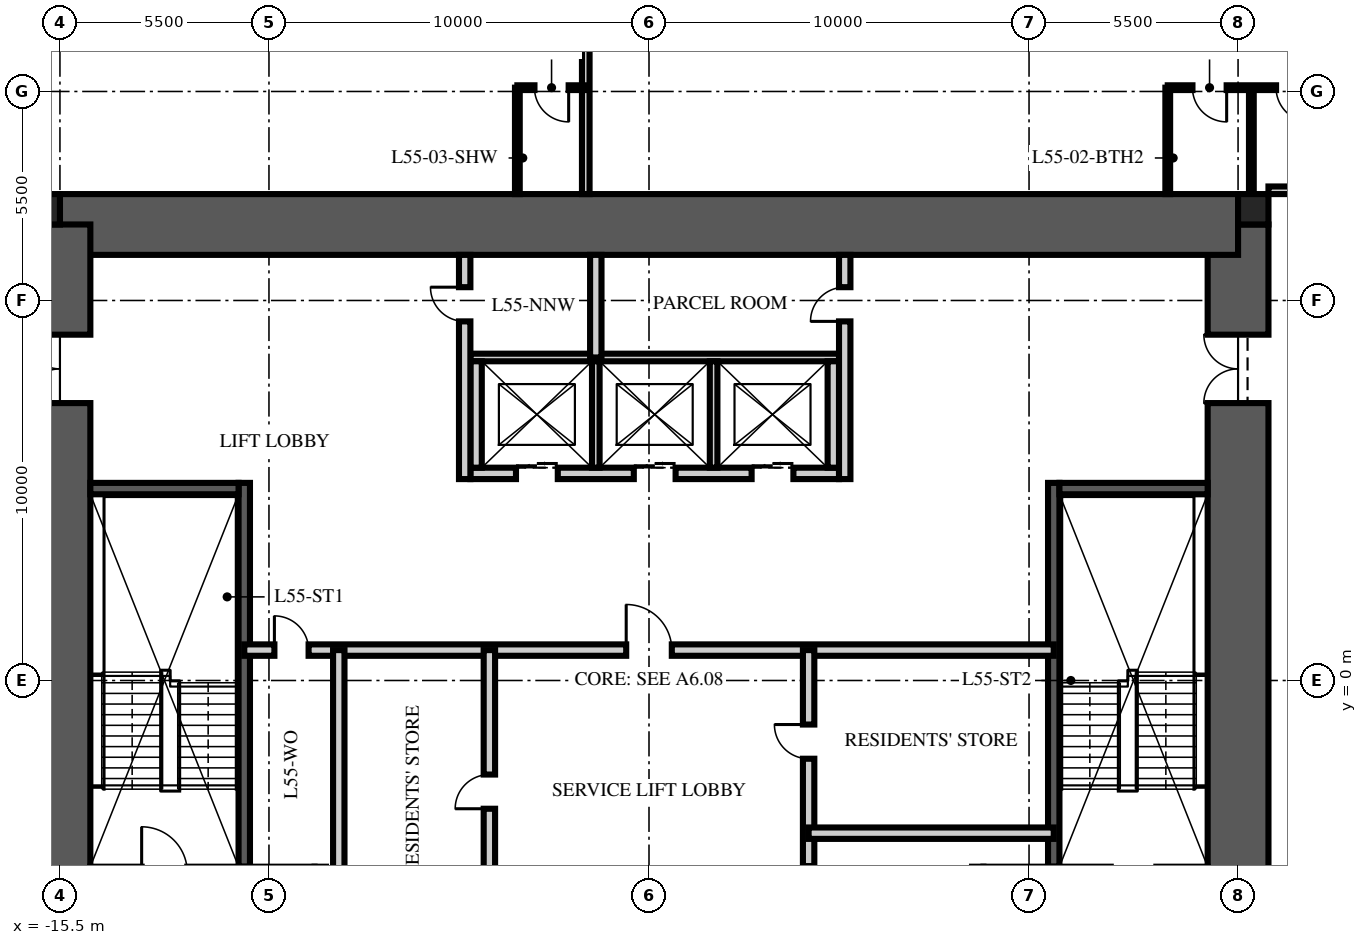
"""IFC4 building model, lengths in metres.
Left out: names, types, materials, properties, quantities, classifications, styles, units other than length and angle.
Written with IfcOpenShell. Run it as: python <this file> out.ifc"""

import sys

from ifc_helpers import new_model, si_unit, direction, frame, frame_2d, origin, origin_2d, place, context, subcontext, project, spatial, rectangle, extrude, element, fill, save


model = new_model("IFC4")
c1 = context("Model", 3, precision=1e-05, world=origin(), true_north=direction((0.0, 1.0)))
c2 = subcontext(c1, "Body", "Model", "MODEL_VIEW")
j1 = project(units=[si_unit("LENGTHUNIT", "METRE"), si_unit("PLANEANGLEUNIT", "RADIAN")], contexts=[c1])
p1 = place(None, origin())
s1 = spatial("IfcSite", under=j1, at=p1, CompositionType="ELEMENT")
p2 = place(p1, origin())
s2 = spatial("IfcBuilding", under=s1, at=p2, CompositionType="ELEMENT")
p3 = place(p2, frame((0.0, 0.0, 222.0)))
s3 = spatial("IfcBuildingStorey", under=s2, at=p3, CompositionType="ELEMENT", Elevation=222.0)
p4 = place(p3, frame((15.5, -12.0, -0.25), z_axis=(0.0, 0.0, 1.0), x_axis=(0.0, 1.0, 0.0)))
e1 = element("IfcWall", 1, at=p4, inside=s3, PredefinedType="SHEAR", context=c2, shape_type="SweptSolid", body=[
    extrude(rectangle(XDim=24.0, YDim=1.6, at=frame_2d((12.0, 0.0))), origin(), (0.0, 0.0, 1.0), 3.75),
])
p5 = place(p4, frame((3.2, 0.0, 0.25)))
e2 = element("IfcOpeningElement", 2, at=p5, cuts=e1, PredefinedType="OPENING", context=c2, shape_type="SweptSolid", body=[
    extrude(rectangle(XDim=1.2, YDim=2.1, at=frame_2d((0.6, 1.05))), frame((0.0, 0.81, 0.0), z_axis=(0.0, -1.0, 0.0), x_axis=(1.0, 0.0, 0.0)), (0.0, 0.0, 1.0), 1.62),
])
p6 = place(p4, frame((19.3, 0.0, 0.25)))
e3 = element("IfcOpeningElement", 3, at=p6, cuts=e1, PredefinedType="OPENING", context=c2, shape_type="SweptSolid", body=[
    extrude(rectangle(XDim=1.8, YDim=2.1, at=frame_2d((0.9, 1.05))), frame((0.0, 0.81, 0.0), z_axis=(0.0, -1.0, 0.0), x_axis=(1.0, 0.0, 0.0)), (0.0, 0.0, 1.0), 1.62),
])
p7 = place(p3, frame((-15.5, 12.0, -0.25), z_axis=(0.0, 0.0, 1.0), x_axis=(1.0, 0.0, 0.0)))
e4 = element("IfcWall", 4, at=p7, inside=s3, PredefinedType="SHEAR", context=c2, shape_type="SweptSolid", body=[
    extrude(rectangle(XDim=31.0, YDim=1.6, at=frame_2d((15.5, 0.0))), origin(), (0.0, 0.0, 1.0), 3.75),
])
p8 = place(p3, frame((-15.5, -12.0, -0.25), z_axis=(0.0, 0.0, 1.0), x_axis=(0.0, 1.0, 0.0)))
e5 = element("IfcWall", 5, at=p8, inside=s3, PredefinedType="SHEAR", context=c2, shape_type="SweptSolid", body=[
    extrude(rectangle(XDim=24.0, YDim=1.6, at=frame_2d((12.0, 0.0))), origin(), (0.0, 0.0, 1.0), 3.75),
])
p9 = place(p8, frame((3.2, 0.0, 0.25)))
e6 = element("IfcOpeningElement", 6, at=p9, cuts=e5, PredefinedType="OPENING", context=c2, shape_type="SweptSolid", body=[
    extrude(rectangle(XDim=1.2, YDim=2.1, at=frame_2d((0.6, 1.05))), frame((0.0, 0.81, 0.0), z_axis=(0.0, -1.0, 0.0), x_axis=(1.0, 0.0, 0.0)), (0.0, 0.0, 1.0), 1.62),
])
p10 = place(p8, frame((19.3, 0.0, 0.25)))
e7 = element("IfcOpeningElement", 7, at=p10, cuts=e5, PredefinedType="OPENING", context=c2, shape_type="SweptSolid", body=[
    extrude(rectangle(XDim=1.8, YDim=2.1, at=frame_2d((0.9, 1.05))), frame((0.0, 0.81, 0.0), z_axis=(0.0, -1.0, 0.0), x_axis=(1.0, 0.0, 0.0)), (0.0, 0.0, 1.0), 1.62),
])
for number, where, z_axis, x_axis in (
    (8, (15.9, 12.4, -0.25), (0.0, 0.0, 1.0), (1.0, 0.0, 0.0)),
    (9, (-15.9, 12.4, -0.25), (0.0, 0.0, 1.0), (1.0, 0.0, 0.0)),
):
    element("IfcColumn", number, at=place(p3, frame(where, z_axis=z_axis, x_axis=x_axis)), inside=s3, PredefinedType="COLUMN", context=c2, shape_type="SweptSolid", body=[
        extrude(rectangle(XDim=0.8, YDim=0.8, at=origin_2d()), origin(), (0.0, 0.0, 1.0), 3.75),
    ])
p11 = place(p3, frame((-10.65, -4.9, 0.0), z_axis=(0.0, 0.0, 1.0), x_axis=(0.0, 1.0, 0.0)))
e10 = element("IfcWall", 10, at=p11, inside=s3, PredefinedType="SOLIDWALL", context=c2, shape_type="SweptSolid", body=[
    extrude(rectangle(XDim=10.1, YDim=0.3, at=frame_2d((5.05, 0.0))), origin(), (0.0, 0.0, 1.0), 3.5),
])
p12 = place(p3, frame((-14.7, 5.05, 0.0), z_axis=(0.0, 0.0, 1.0), x_axis=(1.0, 0.0, 0.0)))
e11 = element("IfcWall", 11, at=p12, inside=s3, PredefinedType="SOLIDWALL", context=c2, shape_type="SweptSolid", body=[
    extrude(rectangle(XDim=3.9, YDim=0.3, at=frame_2d((1.95, 0.0))), origin(), (0.0, 0.0, 1.0), 3.5),
])
p13 = place(p3, frame((10.65, -4.9, 0.0), z_axis=(0.0, 0.0, 1.0), x_axis=(0.0, 1.0, 0.0)))
e12 = element("IfcWall", 12, at=p13, inside=s3, PredefinedType="SOLIDWALL", context=c2, shape_type="SweptSolid", body=[
    extrude(rectangle(XDim=10.1, YDim=0.3, at=frame_2d((5.05, 0.0))), origin(), (0.0, 0.0, 1.0), 3.5),
])
p14 = place(p3, frame((14.7, 5.05, 0.0), z_axis=(0.0, 0.0, 1.0), x_axis=(-1.0, 0.0, 0.0)))
e13 = element("IfcWall", 13, at=p14, inside=s3, PredefinedType="SOLIDWALL", context=c2, shape_type="SweptSolid", body=[
    extrude(rectangle(XDim=3.9, YDim=0.3, at=frame_2d((1.95, 0.0))), origin(), (0.0, 0.0, 1.0), 3.5),
])
p15 = place(p3, frame((-4.7, 5.45, 0.0), z_axis=(0.0, 0.0, 1.0), x_axis=(1.0, 0.0, 0.0)))
e14 = element("IfcWall", 14, at=p15, inside=s3, PredefinedType="PARTITIONING", context=c2, shape_type="SweptSolid", body=[
    extrude(rectangle(XDim=9.7, YDim=0.3, at=frame_2d((4.85, 0.0))), origin(), (0.0, 0.0, 1.0), 3.5),
])
p16 = place(p15, frame((1.2, 0.0, 0.0)))
e15 = element("IfcOpeningElement", 15, at=p16, cuts=e14, PredefinedType="OPENING", context=c2, shape_type="SweptSolid", body=[
    extrude(rectangle(XDim=1.1, YDim=2.1, at=frame_2d((0.55, 1.05))), frame((0.0, 0.16, 0.0), z_axis=(0.0, -1.0, 0.0), x_axis=(1.0, 0.0, 0.0)), (0.0, 0.0, 1.0), 0.32),
])
p17 = place(p15, frame((4.3, 0.0, 0.0)))
e16 = element("IfcOpeningElement", 16, at=p17, cuts=e14, PredefinedType="OPENING", context=c2, shape_type="SweptSolid", body=[
    extrude(rectangle(XDim=1.1, YDim=2.1, at=frame_2d((0.55, 1.05))), frame((0.0, 0.16, 0.0), z_axis=(0.0, -1.0, 0.0), x_axis=(1.0, 0.0, 0.0)), (0.0, 0.0, 1.0), 0.32),
])
p18 = place(p15, frame((7.4, 0.0, 0.0)))
e17 = element("IfcOpeningElement", 17, at=p18, cuts=e14, PredefinedType="OPENING", context=c2, shape_type="SweptSolid", body=[
    extrude(rectangle(XDim=1.1, YDim=2.1, at=frame_2d((0.55, 1.05))), frame((0.0, 0.16, 0.0), z_axis=(0.0, -1.0, 0.0), x_axis=(1.0, 0.0, 0.0)), (0.0, 0.0, 1.0), 0.32),
])
p19 = place(p3, frame((-4.7, 8.5, 0.0), z_axis=(0.0, 0.0, 1.0), x_axis=(1.0, 0.0, 0.0)))
e18 = element("IfcWall", 18, at=p19, inside=s3, PredefinedType="PARTITIONING", context=c2, shape_type="SweptSolid", body=[
    extrude(rectangle(XDim=9.7, YDim=0.2, at=frame_2d((4.85, 0.0))), origin(), (0.0, 0.0, 1.0), 3.5),
])
for number, where, z_axis, x_axis in (
    (19, (-4.55, 5.6, 0.0), (0.0, 0.0, 1.0), (0.0, 1.0, 0.0)),
    (20, (4.85, 5.6, 0.0), (0.0, 0.0, 1.0), (0.0, 1.0, 0.0)),
):
    element("IfcWall", number, at=place(p3, frame(where, z_axis=z_axis, x_axis=x_axis)), inside=s3, PredefinedType="PARTITIONING", context=c2, shape_type="SweptSolid", body=[
        extrude(rectangle(XDim=2.8, YDim=0.3, at=frame_2d((1.4, 0.0))), origin(), (0.0, 0.0, 1.0), 3.5),
    ])
for number, where, z_axis, x_axis in (
    (21, (-1.4, 5.6, 0.0), (0.0, 0.0, 1.0), (0.0, 1.0, 0.0)),
    (22, (1.7, 5.6, 0.0), (0.0, 0.0, 1.0), (0.0, 1.0, 0.0)),
):
    element("IfcWall", number, at=place(p3, frame(where, z_axis=z_axis, x_axis=x_axis)), inside=s3, PredefinedType="PARTITIONING", context=c2, shape_type="SweptSolid", body=[
        extrude(rectangle(XDim=2.8, YDim=0.2, at=frame_2d((1.4, 0.0))), origin(), (0.0, 0.0, 1.0), 3.5),
    ])
p20 = place(p3, frame((-10.65, 0.8, 0.0), z_axis=(0.0, 0.0, 1.0), x_axis=(1.0, 0.0, 0.0)))
e23 = element("IfcWall", 23, at=p20, inside=s3, PredefinedType="PARTITIONING", context=c2, shape_type="SweptSolid", body=[
    extrude(rectangle(XDim=21.3, YDim=0.3, at=frame_2d((10.65, 0.0))), origin(), (0.0, 0.0, 1.0), 3.5),
])
p21 = place(p20, frame((10.05, 0.0, 0.0)))
e24 = element("IfcOpeningElement", 24, at=p21, cuts=e23, PredefinedType="OPENING", context=c2, shape_type="SweptSolid", body=[
    extrude(rectangle(XDim=1.2, YDim=2.1, at=frame_2d((0.6, 1.05))), frame((0.0, 0.16, 0.0), z_axis=(0.0, -1.0, 0.0), x_axis=(1.0, 0.0, 0.0)), (0.0, 0.0, 1.0), 0.32),
])
p22 = place(p20, frame((0.793, 0.0, 0.0)))
e25 = element("IfcOpeningElement", 25, at=p22, cuts=e23, PredefinedType="OPENING", context=c2, shape_type="SweptSolid", body=[
    extrude(rectangle(XDim=0.9, YDim=2.1, at=frame_2d((0.45, 1.05))), frame((0.0, 0.16, 0.0), z_axis=(0.0, -1.0, 0.0), x_axis=(1.0, 0.0, 0.0)), (0.0, 0.0, 1.0), 0.32),
])
p23 = place(p3, frame((-4.2, -6.65, 0.0), z_axis=(0.0, 0.0, 1.0), x_axis=(0.0, 1.0, 0.0)))
e26 = element("IfcWall", 26, at=p23, inside=s3, PredefinedType="PARTITIONING", context=c2, shape_type="SweptSolid", body=[
    extrude(rectangle(XDim=7.45, YDim=0.3, at=frame_2d((3.725, 0.0))), origin(), (0.0, 0.0, 1.0), 3.5),
])
p24 = place(p23, frame((3.275, 0.0, 0.0)))
e27 = element("IfcOpeningElement", 27, at=p24, cuts=e26, PredefinedType="OPENING", context=c2, shape_type="SweptSolid", body=[
    extrude(rectangle(XDim=0.9, YDim=2.1, at=frame_2d((0.45, 1.05))), frame((0.0, 0.16, 0.0), z_axis=(0.0, -1.0, 0.0), x_axis=(1.0, 0.0, 0.0)), (0.0, 0.0, 1.0), 0.32),
])
p25 = place(p3, frame((4.2, -6.65, 0.0), z_axis=(0.0, 0.0, 1.0), x_axis=(0.0, 1.0, 0.0)))
e28 = element("IfcWall", 28, at=p25, inside=s3, PredefinedType="PARTITIONING", context=c2, shape_type="SweptSolid", body=[
    extrude(rectangle(XDim=7.45, YDim=0.3, at=frame_2d((3.725, 0.0))), origin(), (0.0, 0.0, 1.0), 3.5),
])
p26 = place(p25, frame((0.866, 0.0, 0.0)))
e29 = element("IfcOpeningElement", 29, at=p26, cuts=e28, PredefinedType="OPENING", context=c2, shape_type="SweptSolid", body=[
    extrude(rectangle(XDim=0.9, YDim=2.1, at=frame_2d((0.45, 1.05))), frame((0.0, 0.16, 0.0), z_axis=(0.0, -1.0, 0.0), x_axis=(1.0, 0.0, 0.0)), (0.0, 0.0, 1.0), 0.32),
])
p27 = place(p25, frame((4.591, 0.0, 0.0)))
e30 = element("IfcOpeningElement", 30, at=p27, cuts=e28, PredefinedType="OPENING", context=c2, shape_type="SweptSolid", body=[
    extrude(rectangle(XDim=0.9, YDim=2.1, at=frame_2d((0.45, 1.05))), frame((0.0, 0.16, 0.0), z_axis=(0.0, -1.0, 0.0), x_axis=(1.0, 0.0, 0.0)), (0.0, 0.0, 1.0), 0.32),
])
p28 = place(p3, frame((-8.163, -6.65, 0.0), z_axis=(0.0, 0.0, 1.0), x_axis=(0.0, 1.0, 0.0)))
e31 = element("IfcWall", 31, at=p28, inside=s3, PredefinedType="PARTITIONING", context=c2, shape_type="SweptSolid", body=[
    extrude(rectangle(XDim=7.45, YDim=0.3, at=frame_2d((3.725, 0.0))), origin(), (0.0, 0.0, 1.0), 3.5),
])
p29 = place(p3, frame((10.65, -4.018, 0.0), z_axis=(0.0, 0.0, 1.0), x_axis=(-1.0, 0.0, 0.0)))
e32 = element("IfcWall", 32, at=p29, inside=s3, PredefinedType="PARTITIONING", context=c2, shape_type="SweptSolid", body=[
    extrude(rectangle(XDim=6.45, YDim=0.3, at=frame_2d((3.225, 0.0))), origin(), (0.0, 0.0, 1.0), 3.5),
])
p30 = place(p3, frame((-4.85, 5.3, 0.0), z_axis=(0.0, 0.0, 1.0), x_axis=(0.0, 1.0, 0.0)))
e33 = element("IfcWall", 33, at=p30, inside=s3, PredefinedType="PARTITIONING", context=c2, shape_type="SweptSolid", body=[
    extrude(rectangle(XDim=5.9, YDim=0.3, at=frame_2d((2.95, 0.0))), origin(), (0.0, 0.0, 1.0), 3.5),
])
p31 = place(p30, frame((4.15, 0.0, 0.0)))
e34 = element("IfcOpeningElement", 34, at=p31, cuts=e33, PredefinedType="OPENING", context=c2, shape_type="SweptSolid", body=[
    extrude(rectangle(XDim=0.9, YDim=2.1, at=frame_2d((0.45, 1.05))), frame((0.0, 0.16, 0.0), z_axis=(0.0, -1.0, 0.0), x_axis=(1.0, 0.0, 0.0)), (0.0, 0.0, 1.0), 0.32),
])
p32 = place(p3, frame((5.15, 5.3, 0.0), z_axis=(0.0, 0.0, 1.0), x_axis=(0.0, 1.0, 0.0)))
e35 = element("IfcWall", 35, at=p32, inside=s3, PredefinedType="PARTITIONING", context=c2, shape_type="SweptSolid", body=[
    extrude(rectangle(XDim=5.9, YDim=0.3, at=frame_2d((2.95, 0.0))), origin(), (0.0, 0.0, 1.0), 3.5),
])
p33 = place(p32, frame((4.15, 0.0, 0.0)))
e36 = element("IfcOpeningElement", 36, at=p33, cuts=e35, PredefinedType="OPENING", context=c2, shape_type="SweptSolid", body=[
    extrude(rectangle(XDim=0.9, YDim=2.1, at=frame_2d((0.45, 1.05))), frame((0.0, 0.16, 0.0), z_axis=(0.0, -1.0, 0.0), x_axis=(1.0, 0.0, 0.0)), (0.0, 0.0, 1.0), 0.32),
])
p34 = place(p3, frame((-1.4, 8.5, 0.0), z_axis=(0.0, 0.0, 1.0), x_axis=(0.0, 1.0, 0.0)))
e37 = element("IfcWall", 37, at=p34, inside=s3, PredefinedType="PARTITIONING", context=c2, shape_type="SweptSolid", body=[
    extrude(rectangle(XDim=2.7, YDim=0.3, at=frame_2d((1.35, 0.0))), origin(), (0.0, 0.0, 1.0), 3.5),
])
p35 = place(p3, frame((16.3, 12.9, 0.0), z_axis=(0.0, 0.0, 1.0), x_axis=(1.0, 0.0, 0.0)))
e38 = element("IfcWall", 38, at=p35, inside=s3, PredefinedType="PARTITIONING", context=c2, shape_type="SweptSolid", body=[
    extrude(rectangle(XDim=1.6, YDim=0.2, at=frame_2d((0.8, 0.0))), origin(), (0.0, 0.0, 1.0), 2.3),
])
p36 = place(p3, frame((-1.664, 12.8, 0.0), z_axis=(0.0, 0.0, 1.0), x_axis=(0.0, 1.0, 0.0)))
e39 = element("IfcWall", 39, at=p36, inside=s3, PredefinedType="PARTITIONING", context=c2, shape_type="SweptSolid", body=[
    extrude(rectangle(XDim=13.4, YDim=0.2, at=frame_2d((6.7, 0.0))), origin(), (0.0, 0.0, 1.0), 2.91),
])
p37 = place(p3, frame((18.05, 15.6, 0.0), z_axis=(0.0, 0.0, 1.0), x_axis=(-1.0, 0.0, 0.0)))
e40 = element("IfcWall", 40, at=p37, inside=s3, PredefinedType="PARTITIONING", context=c2, shape_type="SweptSolid", body=[
    extrude(rectangle(XDim=4.4, YDim=0.125, at=frame_2d((2.2, 0.0))), origin(), (0.0, 0.0, 1.0), 2.3),
])
p38 = place(p37, frame((0.65, 0.0, 0.0)))
e41 = element("IfcOpeningElement", 41, at=p38, cuts=e40, PredefinedType="OPENING", context=c2, shape_type="SweptSolid", body=[
    extrude(rectangle(XDim=0.9, YDim=2.1, at=frame_2d((0.45, 1.05))), frame((0.0, 0.073, 0.0), z_axis=(0.0, -1.0, 0.0), x_axis=(1.0, 0.0, 0.0)), (0.0, 0.0, 1.0), 0.145),
])
p39 = place(p37, frame((2.85, 0.0, 0.0)))
e42 = element("IfcOpeningElement", 42, at=p39, cuts=e40, PredefinedType="OPENING", context=c2, shape_type="SweptSolid", body=[
    extrude(rectangle(XDim=0.9, YDim=2.1, at=frame_2d((0.45, 1.05))), frame((0.0, 0.073, 0.0), z_axis=(0.0, -1.0, 0.0), x_axis=(1.0, 0.0, 0.0)), (0.0, 0.0, 1.0), 0.145),
])
p40 = place(p3, frame((15.85, 12.8, 0.0), z_axis=(0.0, 0.0, 1.0), x_axis=(0.0, 1.0, 0.0)))
e43 = element("IfcWall", 43, at=p40, inside=s3, PredefinedType="PARTITIONING", context=c2, shape_type="SweptSolid", body=[
    extrude(rectangle(XDim=2.8, YDim=0.125, at=frame_2d((1.4, 0.0))), origin(), (0.0, 0.0, 1.0), 2.3),
])
p41 = place(p3, frame((13.65, 12.8, 0.0), z_axis=(0.0, 0.0, 1.0), x_axis=(0.0, 1.0, 0.0)))
e44 = element("IfcWall", 44, at=p41, inside=s3, PredefinedType="PARTITIONING", context=c2, shape_type="SweptSolid", body=[
    extrude(rectangle(XDim=2.8, YDim=0.125, at=frame_2d((1.4, 0.0))), origin(), (0.0, 0.0, 1.0), 3.5),
])
p42 = place(p3, frame((-1.664, 15.6, 0.0), z_axis=(0.0, 0.0, 1.0), x_axis=(-1.0, 0.0, 0.0)))
e45 = element("IfcWall", 45, at=p42, inside=s3, PredefinedType="PARTITIONING", context=c2, shape_type="SweptSolid", body=[
    extrude(rectangle(XDim=1.8, YDim=0.125, at=frame_2d((0.9, 0.0))), origin(), (0.0, 0.0, 1.0), 3.5),
])
p43 = place(p42, frame((0.45, 0.0, 0.0)))
e46 = element("IfcOpeningElement", 46, at=p43, cuts=e45, PredefinedType="OPENING", context=c2, shape_type="SweptSolid", body=[
    extrude(rectangle(XDim=0.9, YDim=2.1, at=frame_2d((0.45, 1.05))), frame((0.0, 0.073, 0.0), z_axis=(0.0, -1.0, 0.0), x_axis=(1.0, 0.0, 0.0)), (0.0, 0.0, 1.0), 0.145),
])
p44 = place(p3, frame((-3.464, 12.8, 0.0), z_axis=(0.0, 0.0, 1.0), x_axis=(0.0, 1.0, 0.0)))
e47 = element("IfcWall", 47, at=p44, inside=s3, PredefinedType="PARTITIONING", context=c2, shape_type="SweptSolid", body=[
    extrude(rectangle(XDim=2.8, YDim=0.125, at=frame_2d((1.4, 0.0))), origin(), (0.0, 0.0, 1.0), 3.5),
])
p45 = place(p10, origin())
e48 = element("IfcDoor", 48, at=p45, inside=s3, OperationType="DOUBLE_DOOR_SINGLE_SWING", PredefinedType="DOOR", context=c2, shape_type="SweptSolid", body=[
    extrude(rectangle(XDim=1.8, YDim=2.1, at=frame_2d((0.9, 1.05))), frame((0.0, 0.025, 0.0), z_axis=(0.0, -1.0, 0.0), x_axis=(1.0, 0.0, 0.0)), (0.0, 0.0, 1.0), 0.05),
])
fill(e7, e48)
p46 = place(p6, origin())
e49 = element("IfcDoor", 49, at=p46, inside=s3, OperationType="DOUBLE_DOOR_SINGLE_SWING", PredefinedType="DOOR", context=c2, shape_type="SweptSolid", body=[
    extrude(rectangle(XDim=1.8, YDim=2.1, at=frame_2d((0.9, 1.05))), frame((0.0, 0.025, 0.0), z_axis=(0.0, -1.0, 0.0), x_axis=(1.0, 0.0, 0.0)), (0.0, 0.0, 1.0), 0.05),
])
fill(e3, e49)
p47 = place(p16, origin())
e50 = element("IfcDoor", 50, at=p47, inside=s3, OperationType="DOUBLE_DOOR_SLIDING", PredefinedType="DOOR", context=c2, shape_type="SweptSolid", body=[
    extrude(rectangle(XDim=1.1, YDim=2.1, at=frame_2d((0.55, 1.05))), frame((0.0, 0.025, 0.0), z_axis=(0.0, -1.0, 0.0), x_axis=(1.0, 0.0, 0.0)), (0.0, 0.0, 1.0), 0.05),
])
fill(e15, e50)
p48 = place(p17, origin())
e51 = element("IfcDoor", 51, at=p48, inside=s3, OperationType="DOUBLE_DOOR_SLIDING", PredefinedType="DOOR", context=c2, shape_type="SweptSolid", body=[
    extrude(rectangle(XDim=1.1, YDim=2.1, at=frame_2d((0.55, 1.05))), frame((0.0, 0.025, 0.0), z_axis=(0.0, -1.0, 0.0), x_axis=(1.0, 0.0, 0.0)), (0.0, 0.0, 1.0), 0.05),
])
fill(e16, e51)
p49 = place(p18, origin())
e52 = element("IfcDoor", 52, at=p49, inside=s3, OperationType="DOUBLE_DOOR_SLIDING", PredefinedType="DOOR", context=c2, shape_type="SweptSolid", body=[
    extrude(rectangle(XDim=1.1, YDim=2.1, at=frame_2d((0.55, 1.05))), frame((0.0, 0.025, 0.0), z_axis=(0.0, -1.0, 0.0), x_axis=(1.0, 0.0, 0.0)), (0.0, 0.0, 1.0), 0.05),
])
fill(e17, e52)
p50 = place(p21, origin())
e53 = element("IfcDoor", 53, at=p50, inside=s3, OperationType="SINGLE_SWING_LEFT", PredefinedType="DOOR", context=c2, shape_type="SweptSolid", body=[
    extrude(rectangle(XDim=1.2, YDim=2.1, at=frame_2d((0.6, 1.05))), frame((0.0, 0.025, 0.0), z_axis=(0.0, -1.0, 0.0), x_axis=(1.0, 0.0, 0.0)), (0.0, 0.0, 1.0), 0.05),
])
fill(e24, e53)
p51 = place(p24, origin())
e54 = element("IfcDoor", 54, at=p51, inside=s3, OperationType="SINGLE_SWING_LEFT", PredefinedType="DOOR", context=c2, shape_type="SweptSolid", body=[
    extrude(rectangle(XDim=0.9, YDim=2.1, at=frame_2d((0.45, 1.05))), frame((0.0, 0.025, 0.0), z_axis=(0.0, -1.0, 0.0), x_axis=(1.0, 0.0, 0.0)), (0.0, 0.0, 1.0), 0.05),
])
fill(e27, e54)
p52 = place(p22, origin())
e55 = element("IfcDoor", 55, at=p52, inside=s3, OperationType="SINGLE_SWING_LEFT", PredefinedType="DOOR", context=c2, shape_type="SweptSolid", body=[
    extrude(rectangle(XDim=0.9, YDim=2.1, at=frame_2d((0.45, 1.05))), frame((0.0, 0.025, 0.0), z_axis=(0.0, -1.0, 0.0), x_axis=(1.0, 0.0, 0.0)), (0.0, 0.0, 1.0), 0.05),
])
fill(e25, e55)
p53 = place(p27, origin())
e56 = element("IfcDoor", 56, at=p53, inside=s3, OperationType="SINGLE_SWING_RIGHT", PredefinedType="DOOR", context=c2, shape_type="SweptSolid", body=[
    extrude(rectangle(XDim=0.9, YDim=2.1, at=frame_2d((0.45, 1.05))), frame((0.0, 0.025, 0.0), z_axis=(0.0, -1.0, 0.0), x_axis=(1.0, 0.0, 0.0)), (0.0, 0.0, 1.0), 0.05),
])
fill(e30, e56)
p54 = place(p31, origin())
e57 = element("IfcDoor", 57, at=p54, inside=s3, OperationType="SINGLE_SWING_RIGHT", PredefinedType="DOOR", context=c2, shape_type="SweptSolid", body=[
    extrude(rectangle(XDim=0.9, YDim=2.1, at=frame_2d((0.45, 1.05))), frame((0.0, 0.025, 0.0), z_axis=(0.0, -1.0, 0.0), x_axis=(1.0, 0.0, 0.0)), (0.0, 0.0, 1.0), 0.05),
])
fill(e34, e57)
p55 = place(p33, origin())
e58 = element("IfcDoor", 58, at=p55, inside=s3, OperationType="SINGLE_SWING_LEFT", PredefinedType="DOOR", context=c2, shape_type="SweptSolid", body=[
    extrude(rectangle(XDim=0.9, YDim=2.1, at=frame_2d((0.45, 1.05))), frame((0.0, 0.025, 0.0), z_axis=(0.0, -1.0, 0.0), x_axis=(1.0, 0.0, 0.0)), (0.0, 0.0, 1.0), 0.05),
])
fill(e36, e58)
p56 = place(p38, origin())
e59 = element("IfcDoor", 59, at=p56, inside=s3, OperationType="SINGLE_SWING_LEFT", PredefinedType="DOOR", context=c2, shape_type="SweptSolid", body=[
    extrude(rectangle(XDim=0.9, YDim=2.1, at=frame_2d((0.45, 1.05))), frame((0.0, 0.025, 0.0), z_axis=(0.0, -1.0, 0.0), x_axis=(1.0, 0.0, 0.0)), (0.0, 0.0, 1.0), 0.05),
])
fill(e41, e59)
p57 = place(p39, origin())
e60 = element("IfcDoor", 60, at=p57, inside=s3, OperationType="SINGLE_SWING_LEFT", PredefinedType="DOOR", context=c2, shape_type="SweptSolid", body=[
    extrude(rectangle(XDim=0.9, YDim=2.1, at=frame_2d((0.45, 1.05))), frame((0.0, 0.025, 0.0), z_axis=(0.0, -1.0, 0.0), x_axis=(1.0, 0.0, 0.0)), (0.0, 0.0, 1.0), 0.05),
])
fill(e42, e60)
p58 = place(p43, origin())
e61 = element("IfcDoor", 61, at=p58, inside=s3, OperationType="SINGLE_SWING_LEFT", PredefinedType="DOOR", context=c2, shape_type="SweptSolid", body=[
    extrude(rectangle(XDim=0.9, YDim=2.1, at=frame_2d((0.45, 1.05))), frame((0.0, 0.025, 0.0), z_axis=(0.0, -1.0, 0.0), x_axis=(1.0, 0.0, 0.0)), (0.0, 0.0, 1.0), 0.05),
])
fill(e46, e61)
save(model, sys.argv[1])
